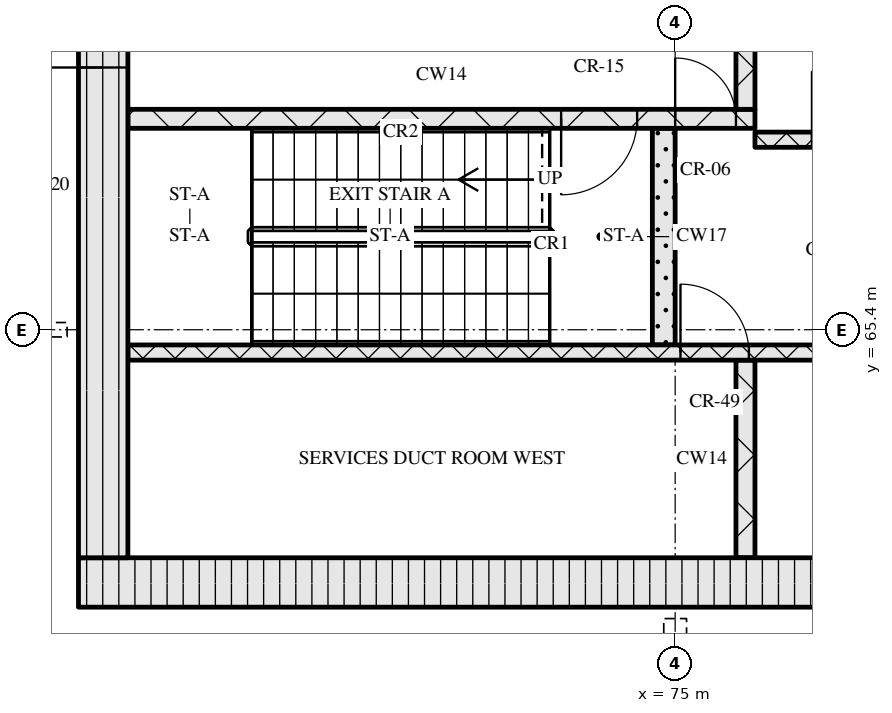
"""IFC4 building model, lengths in metres.
Left out: names, types, materials, properties, quantities, classifications, styles, units other than length and angle.
Written with IfcOpenShell. Run it as: python <this file> out.ifc"""

import sys

from ifc_helpers import new_model, si_unit, direction, frame, frame_2d, origin, place, context, subcontext, project, spatial, rectangle, extrude, element, fill, save


model = new_model("IFC4")
c1 = context("Model", 3, precision=1e-05, world=origin(), true_north=direction((0.0, 1.0)))
c2 = subcontext(c1, "Body", "Model", "MODEL_VIEW")
j1 = project(units=[si_unit("LENGTHUNIT", "METRE"), si_unit("PLANEANGLEUNIT", "RADIAN")], contexts=[c1])
p1 = place(None, origin())
s1 = spatial("IfcSite", under=j1, at=p1, CompositionType="ELEMENT")
p2 = place(p1, origin())
s2 = spatial("IfcBuilding", under=s1, at=p2, CompositionType="ELEMENT")
p3 = place(p2, frame((0.0, 0.0, 194.25)))
s3 = spatial("IfcBuildingStorey", under=s2, at=p3, CompositionType="ELEMENT", Elevation=194.25)
p4 = place(p3, frame((67.15, 62.075, 0.0), z_axis=(0.0, 0.0, 1.0), x_axis=(1.0, 0.0, 0.0)))
e1 = element("IfcWall", 1, at=p4, inside=s3, PredefinedType="SOLIDWALL", context=c2, shape_type="SweptSolid", body=[
    extrude(rectangle(XDim=40.9, YDim=0.65, at=frame_2d((20.45, 0.0))), origin(), (0.0, 0.0, 1.0), 10.97),
])
p5 = place(p4, frame((20.8, 0.0, 0.0)))
e2 = element("IfcOpeningElement", 2, at=p5, cuts=e1, PredefinedType="OPENING", context=c2, shape_type="SweptSolid", body=[
    extrude(rectangle(XDim=1.8, YDim=2.1, at=frame_2d((0.9, 1.05))), frame((0.0, 0.335, 0.0), z_axis=(0.0, -1.0, 0.0), x_axis=(1.0, 0.0, 0.0)), (0.0, 0.0, 1.0), 0.67),
])
p6 = place(p3, frame((67.475, 62.4, 0.0), z_axis=(0.0, 0.0, 1.0), x_axis=(0.0, 1.0, 0.0)))
e3 = element("IfcWall", 3, at=p6, inside=s3, PredefinedType="SOLIDWALL", context=c2, shape_type="SweptSolid", body=[
    extrude(rectangle(XDim=12.0, YDim=0.65, at=frame_2d((6.0, 0.0))), origin(), (0.0, 0.0, 1.0), 10.97),
])
p7 = place(p6, frame((6.45, 0.0, 0.0)))
e4 = element("IfcOpeningElement", 4, at=p7, cuts=e3, PredefinedType="OPENING", context=c2, shape_type="SweptSolid", body=[
    extrude(rectangle(XDim=1.2, YDim=2.1, at=frame_2d((0.6, 1.05))), frame((0.0, 0.335, 0.0), z_axis=(0.0, -1.0, 0.0), x_axis=(1.0, 0.0, 0.0)), (0.0, 0.0, 1.0), 0.67),
])
p8 = place(p3, frame((75.925, 62.4, 0.0), z_axis=(0.0, 0.0, 1.0), x_axis=(0.0, 1.0, 0.0)))
e5 = element("IfcWall", 5, at=p8, inside=s3, PredefinedType="SOLIDWALL", context=c2, shape_type="SweptSolid", body=[
    extrude(rectangle(XDim=2.6, YDim=0.25, at=frame_2d((1.3, 0.0))), origin(), (0.0, 0.0, 1.0), 10.97),
])
p9 = place(p3, frame((67.8, 65.1, 0.0), z_axis=(0.0, 0.0, 1.0), x_axis=(1.0, 0.0, 0.0)))
e6 = element("IfcWall", 6, at=p9, inside=s3, PredefinedType="SOLIDWALL", context=c2, shape_type="SweptSolid", body=[
    extrude(rectangle(XDim=18.5, YDim=0.2, at=frame_2d((9.25, 0.0))), origin(), (0.0, 0.0, 1.0), 10.97),
])
p10 = place(p9, frame((7.27, 0.0, 0.0)))
e7 = element("IfcOpeningElement", 7, at=p10, cuts=e6, PredefinedType="OPENING", context=c2, shape_type="SweptSolid", body=[
    extrude(rectangle(XDim=0.9, YDim=2.1, at=frame_2d((0.45, 1.05))), frame((0.0, 0.11, 0.0), z_axis=(0.0, -1.0, 0.0), x_axis=(1.0, 0.0, 0.0)), (0.0, 0.0, 1.0), 0.22),
])
p11 = place(p9, frame((9.65, 0.0, 0.0)))
e8 = element("IfcOpeningElement", 8, at=p11, cuts=e6, PredefinedType="OPENING", context=c2, shape_type="SweptSolid", body=[
    extrude(rectangle(XDim=0.9, YDim=2.1, at=frame_2d((0.45, 1.05))), frame((0.0, 0.11, 0.0), z_axis=(0.0, -1.0, 0.0), x_axis=(1.0, 0.0, 0.0)), (0.0, 0.0, 1.0), 0.22),
])
p12 = place(p9, frame((13.36, 0.0, 0.0)))
e9 = element("IfcOpeningElement", 9, at=p12, cuts=e6, PredefinedType="OPENING", context=c2, shape_type="SweptSolid", body=[
    extrude(rectangle(XDim=0.9, YDim=2.1, at=frame_2d((0.45, 1.05))), frame((0.0, 0.11, 0.0), z_axis=(0.0, -1.0, 0.0), x_axis=(1.0, 0.0, 0.0)), (0.0, 0.0, 1.0), 0.22),
])
p13 = place(p9, frame((16.7, 0.0, 0.0)))
e10 = element("IfcOpeningElement", 10, at=p13, cuts=e6, PredefinedType="OPENING", context=c2, shape_type="SweptSolid", body=[
    extrude(rectangle(XDim=0.9, YDim=2.1, at=frame_2d((0.45, 1.05))), frame((0.0, 0.11, 0.0), z_axis=(0.0, -1.0, 0.0), x_axis=(1.0, 0.0, 0.0)), (0.0, 0.0, 1.0), 0.22),
])
p14 = place(p3, frame((74.85, 65.2, 0.0), z_axis=(0.0, 0.0, 1.0), x_axis=(0.0, 1.0, 0.0)))
e11 = element("IfcWall", 11, at=p14, inside=s3, PredefinedType="SOLIDWALL", context=c2, shape_type="SweptSolid", body=[
    extrude(rectangle(XDim=2.85, YDim=0.3, at=frame_2d((1.425, 0.0))), origin(), (0.0, 0.0, 1.0), 10.97),
])
p15 = place(p3, frame((76.05, 67.9, 0.0), z_axis=(0.0, 0.0, 1.0), x_axis=(1.0, 0.0, 0.0)))
e12 = element("IfcWall", 12, at=p15, inside=s3, PredefinedType="SOLIDWALL", context=c2, shape_type="SweptSolid", body=[
    extrude(rectangle(XDim=23.1, YDim=0.2, at=frame_2d((11.55, 0.0))), origin(), (0.0, 0.0, 1.0), 10.97),
])
p16 = place(p15, frame((0.75, 0.0, 0.0)))
e13 = element("IfcOpeningElement", 13, at=p16, cuts=e12, PredefinedType="OPENING", context=c2, shape_type="SweptSolid", body=[
    extrude(rectangle(XDim=0.9, YDim=2.1, at=frame_2d((0.45, 1.05))), frame((0.0, 0.11, 0.0), z_axis=(0.0, -1.0, 0.0), x_axis=(1.0, 0.0, 0.0)), (0.0, 0.0, 1.0), 0.22),
])
p17 = place(p15, frame((3.32, 0.0, 0.0)))
e14 = element("IfcOpeningElement", 14, at=p17, cuts=e12, PredefinedType="OPENING", context=c2, shape_type="SweptSolid", body=[
    extrude(rectangle(XDim=0.9, YDim=2.1, at=frame_2d((0.45, 1.05))), frame((0.0, 0.11, 0.0), z_axis=(0.0, -1.0, 0.0), x_axis=(1.0, 0.0, 0.0)), (0.0, 0.0, 1.0), 0.22),
])
p18 = place(p15, frame((5.77, 0.0, 0.0)))
e15 = element("IfcOpeningElement", 15, at=p18, cuts=e12, PredefinedType="OPENING", context=c2, shape_type="SweptSolid", body=[
    extrude(rectangle(XDim=0.9, YDim=2.1, at=frame_2d((0.45, 1.05))), frame((0.0, 0.11, 0.0), z_axis=(0.0, -1.0, 0.0), x_axis=(1.0, 0.0, 0.0)), (0.0, 0.0, 1.0), 0.22),
])
p19 = place(p15, frame((8.45, 0.0, 0.0)))
e16 = element("IfcOpeningElement", 16, at=p19, cuts=e12, PredefinedType="OPENING", context=c2, shape_type="SweptSolid", body=[
    extrude(rectangle(XDim=0.9, YDim=2.1, at=frame_2d((0.45, 1.05))), frame((0.0, 0.11, 0.0), z_axis=(0.0, -1.0, 0.0), x_axis=(1.0, 0.0, 0.0)), (0.0, 0.0, 1.0), 0.22),
])
p20 = place(p15, frame((10.91, 0.0, 0.0)))
e17 = element("IfcOpeningElement", 17, at=p20, cuts=e12, PredefinedType="OPENING", context=c2, shape_type="SweptSolid", body=[
    extrude(rectangle(XDim=0.9, YDim=2.1, at=frame_2d((0.45, 1.05))), frame((0.0, 0.11, 0.0), z_axis=(0.0, -1.0, 0.0), x_axis=(1.0, 0.0, 0.0)), (0.0, 0.0, 1.0), 0.22),
])
p21 = place(p15, frame((13.55, 0.0, 0.0)))
e18 = element("IfcOpeningElement", 18, at=p21, cuts=e12, PredefinedType="OPENING", context=c2, shape_type="SweptSolid", body=[
    extrude(rectangle(XDim=1.0, YDim=2.1, at=frame_2d((0.5, 1.05))), frame((0.0, 0.11, 0.0), z_axis=(0.0, -1.0, 0.0), x_axis=(1.0, 0.0, 0.0)), (0.0, 0.0, 1.0), 0.22),
])
p22 = place(p15, frame((16.2, 0.0, 0.0)))
e19 = element("IfcOpeningElement", 19, at=p22, cuts=e12, PredefinedType="OPENING", context=c2, shape_type="SweptSolid", body=[
    extrude(rectangle(XDim=1.1, YDim=2.1, at=frame_2d((0.55, 1.05))), frame((0.0, 0.11, 0.0), z_axis=(0.0, -1.0, 0.0), x_axis=(1.0, 0.0, 0.0)), (0.0, 0.0, 1.0), 0.22),
])
p23 = place(p15, frame((18.7, 0.0, 0.0)))
e20 = element("IfcOpeningElement", 20, at=p23, cuts=e12, PredefinedType="OPENING", context=c2, shape_type="SweptSolid", body=[
    extrude(rectangle(XDim=1.1, YDim=2.1, at=frame_2d((0.55, 1.05))), frame((0.0, 0.11, 0.0), z_axis=(0.0, -1.0, 0.0), x_axis=(1.0, 0.0, 0.0)), (0.0, 0.0, 1.0), 0.22),
])
p24 = place(p15, frame((21.2, 0.0, 0.0)))
e21 = element("IfcOpeningElement", 21, at=p24, cuts=e12, PredefinedType="OPENING", context=c2, shape_type="SweptSolid", body=[
    extrude(rectangle(XDim=1.1, YDim=2.1, at=frame_2d((0.55, 1.05))), frame((0.0, 0.11, 0.0), z_axis=(0.0, -1.0, 0.0), x_axis=(1.0, 0.0, 0.0)), (0.0, 0.0, 1.0), 0.22),
])
p25 = place(p3, frame((67.8, 68.175, 0.0), z_axis=(0.0, 0.0, 1.0), x_axis=(1.0, 0.0, 0.0)))
e22 = element("IfcWall", 22, at=p25, inside=s3, PredefinedType="SOLIDWALL", context=c2, shape_type="SweptSolid", body=[
    extrude(rectangle(XDim=8.25, YDim=0.25, at=frame_2d((4.125, 0.0))), origin(), (0.0, 0.0, 1.0), 10.97),
])
p26 = place(p25, frame((5.7, 0.0, 0.0)))
e23 = element("IfcOpeningElement", 23, at=p26, cuts=e22, PredefinedType="OPENING", context=c2, shape_type="SweptSolid", body=[
    extrude(rectangle(XDim=1.0, YDim=2.1, at=frame_2d((0.5, 1.05))), frame((0.0, 0.135, 0.0), z_axis=(0.0, -1.0, 0.0), x_axis=(1.0, 0.0, 0.0)), (0.0, 0.0, 1.0), 0.27),
])
p27 = place(p25, frame((7.2, 0.0, 0.0)))
e24 = element("IfcOpeningElement", 24, at=p27, cuts=e22, PredefinedType="OPENING", context=c2, shape_type="SweptSolid", body=[
    extrude(rectangle(XDim=0.8, YDim=2.1, at=frame_2d((0.4, 1.05))), frame((0.0, 0.135, 0.0), z_axis=(0.0, -1.0, 0.0), x_axis=(1.0, 0.0, 0.0)), (0.0, 0.0, 1.0), 0.27),
])
p28 = place(p3, frame((75.925, 68.3, 0.0), z_axis=(0.0, 0.0, 1.0), x_axis=(0.0, 1.0, 0.0)))
e25 = element("IfcWall", 25, at=p28, inside=s3, PredefinedType="SOLIDWALL", context=c2, shape_type="SweptSolid", body=[
    extrude(rectangle(XDim=2.3, YDim=0.25, at=frame_2d((1.15, 0.0))), origin(), (0.0, 0.0, 1.0), 10.97),
])
p29 = place(p10, origin())
e26 = element("IfcDoor", 26, at=p29, inside=s3, OperationType="SINGLE_SWING_LEFT", PredefinedType="DOOR", context=c2, shape_type="SweptSolid", body=[
    extrude(rectangle(XDim=0.9, YDim=2.1, at=frame_2d((0.45, 1.05))), frame((0.0, 0.025, 0.0), z_axis=(0.0, -1.0, 0.0), x_axis=(1.0, 0.0, 0.0)), (0.0, 0.0, 1.0), 0.05),
])
fill(e7, e26)
p30 = place(p26, origin())
e27 = element("IfcDoor", 27, at=p30, inside=s3, OperationType="SINGLE_SWING_RIGHT", PredefinedType="DOOR", context=c2, shape_type="SweptSolid", body=[
    extrude(rectangle(XDim=1.0, YDim=2.1, at=frame_2d((0.5, 1.05))), frame((0.0, 0.025, 0.0), z_axis=(0.0, -1.0, 0.0), x_axis=(1.0, 0.0, 0.0)), (0.0, 0.0, 1.0), 0.05),
])
fill(e23, e27)
p31 = place(p27, origin())
e28 = element("IfcDoor", 28, at=p31, inside=s3, OperationType="SINGLE_SWING_LEFT", PredefinedType="DOOR", context=c2, shape_type="SweptSolid", body=[
    extrude(rectangle(XDim=0.8, YDim=2.1, at=frame_2d((0.4, 1.05))), frame((0.0, 0.025, 0.0), z_axis=(0.0, -1.0, 0.0), x_axis=(1.0, 0.0, 0.0)), (0.0, 0.0, 1.0), 0.05),
])
fill(e24, e28)
p32 = place(p7, origin())
e29 = element("IfcDoor", 29, at=p32, inside=s3, OperationType="SINGLE_SWING_LEFT", PredefinedType="DOOR", context=c2, shape_type="SweptSolid", body=[
    extrude(rectangle(XDim=1.2, YDim=2.1, at=frame_2d((0.6, 1.05))), frame((0.0, 0.025, 0.0), z_axis=(0.0, -1.0, 0.0), x_axis=(1.0, 0.0, 0.0)), (0.0, 0.0, 1.0), 0.05),
])
fill(e4, e29)
save(model, sys.argv[1])
